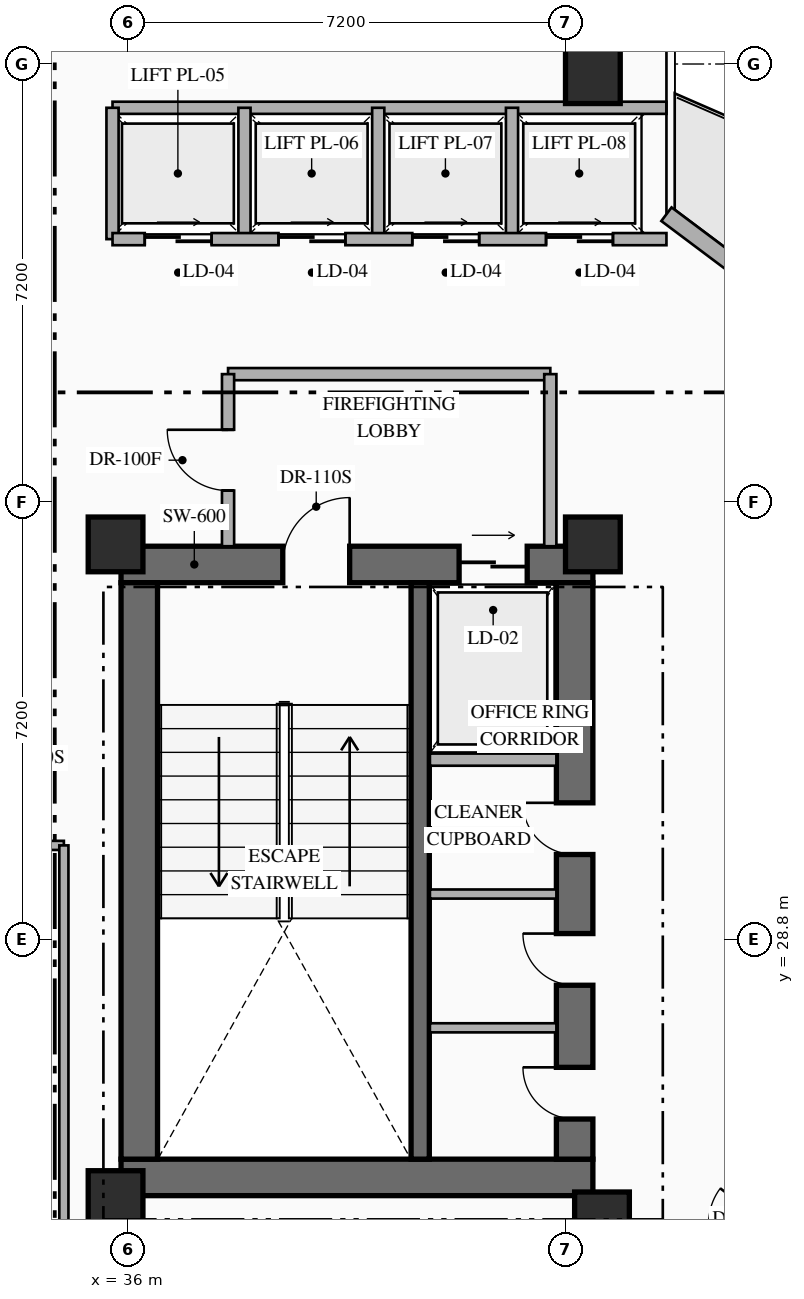
"""IFC4 building model, lengths in metres.
Left out: names, types, materials, properties, quantities, classifications, styles, units other than length and angle.
Written with IfcOpenShell. Run it as: python <this file> out.ifc"""

import sys

from ifc_helpers import new_model, si_unit, direction, frame, frame_2d, origin, origin_2d, place, context, subcontext, project, spatial, rectangle, extrude, element, fill, save


model = new_model("IFC4")
c1 = context("Model", 3, precision=1e-05, world=origin(), true_north=direction((0.0, 1.0)))
c2 = subcontext(c1, "Body", "Model", "MODEL_VIEW")
j1 = project(units=[si_unit("LENGTHUNIT", "METRE"), si_unit("PLANEANGLEUNIT", "RADIAN")], contexts=[c1])
p1 = place(None, origin())
s1 = spatial("IfcSite", under=j1, at=p1, CompositionType="ELEMENT")
p2 = place(p1, origin())
s2 = spatial("IfcBuilding", under=s1, at=p2, CompositionType="ELEMENT")
p3 = place(p2, frame((0.0, 0.0, 126.45)))
s3 = spatial("IfcBuildingStorey", under=s2, at=p3, CompositionType="ELEMENT", Elevation=126.45)
p4 = place(p3, frame((35.89, 24.89, 0.0), z_axis=(0.0, 0.0, 1.0), x_axis=(1.0, 0.0, 0.0)))
e1 = element("IfcWall", 1, at=p4, inside=s3, PredefinedType="SHEAR", context=c2, shape_type="SweptSolid", body=[
    extrude(rectangle(XDim=7.76, YDim=0.6, at=frame_2d((3.88, 0.0))), origin(), (0.0, 0.0, 1.0), 3.6),
])
p5 = place(p3, frame((35.89, 34.97, 0.0), z_axis=(0.0, 0.0, 1.0), x_axis=(1.0, 0.0, 0.0)))
e2 = element("IfcWall", 2, at=p5, inside=s3, PredefinedType="SHEAR", context=c2, shape_type="SweptSolid", body=[
    extrude(rectangle(XDim=7.76, YDim=0.6, at=frame_2d((3.88, 0.0))), origin(), (0.0, 0.0, 1.0), 3.6),
])
p6 = place(p5, frame((2.66, 0.0, 0.0)))
e3 = element("IfcOpeningElement", 3, at=p6, cuts=e2, PredefinedType="OPENING", context=c2, shape_type="SweptSolid", body=[
    extrude(rectangle(XDim=1.1, YDim=2.2, at=frame_2d((0.55, 1.1))), frame((0.0, 0.31, 0.0), z_axis=(0.0, -1.0, 0.0), x_axis=(1.0, 0.0, 0.0)), (0.0, 0.0, 1.0), 0.62),
])
p7 = place(p5, frame((5.56, 0.0, 0.0)))
e4 = element("IfcOpeningElement", 4, at=p7, cuts=e2, PredefinedType="OPENING", context=c2, shape_type="SweptSolid", body=[
    extrude(rectangle(XDim=1.12, YDim=2.15, at=frame_2d((0.56, 1.075))), frame((0.0, 0.31, 0.0), z_axis=(0.0, -1.0, 0.0), x_axis=(1.0, 0.0, 0.0)), (0.0, 0.0, 1.0), 0.62),
])
p8 = place(p3, frame((36.19, 25.19, 0.0), z_axis=(0.0, 0.0, 1.0), x_axis=(0.0, 1.0, 0.0)))
e5 = element("IfcWall", 5, at=p8, inside=s3, PredefinedType="SHEAR", context=c2, shape_type="SweptSolid", body=[
    extrude(rectangle(XDim=9.48, YDim=0.6, at=frame_2d((4.74, 0.0))), origin(), (0.0, 0.0, 1.0), 3.6),
])
p9 = place(p3, frame((43.35, 25.19, 0.0), z_axis=(0.0, 0.0, 1.0), x_axis=(0.0, 1.0, 0.0)))
e6 = element("IfcWall", 6, at=p9, inside=s3, PredefinedType="SHEAR", context=c2, shape_type="SweptSolid", body=[
    extrude(rectangle(XDim=9.48, YDim=0.6, at=frame_2d((4.74, 0.0))), origin(), (0.0, 0.0, 1.0), 3.6),
])
p10 = place(p9, frame((0.66, 0.0, 0.0)))
e7 = element("IfcOpeningElement", 7, at=p10, cuts=e6, PredefinedType="OPENING", context=c2, shape_type="SweptSolid", body=[
    extrude(rectangle(XDim=0.85, YDim=2.08, at=frame_2d((0.425, 1.04))), frame((0.0, 0.31, 0.0), z_axis=(0.0, -1.0, 0.0), x_axis=(1.0, 0.0, 0.0)), (0.0, 0.0, 1.0), 0.62),
])
p11 = place(p9, frame((2.86, 0.0, 0.0)))
e8 = element("IfcOpeningElement", 8, at=p11, cuts=e6, PredefinedType="OPENING", context=c2, shape_type="SweptSolid", body=[
    extrude(rectangle(XDim=0.85, YDim=2.08, at=frame_2d((0.425, 1.04))), frame((0.0, 0.31, 0.0), z_axis=(0.0, -1.0, 0.0), x_axis=(1.0, 0.0, 0.0)), (0.0, 0.0, 1.0), 0.62),
])
p12 = place(p9, frame((5.01, 0.0, 0.0)))
e9 = element("IfcOpeningElement", 9, at=p12, cuts=e6, PredefinedType="OPENING", context=c2, shape_type="SweptSolid", body=[
    extrude(rectangle(XDim=0.85, YDim=2.08, at=frame_2d((0.425, 1.04))), frame((0.0, 0.31, 0.0), z_axis=(0.0, -1.0, 0.0), x_axis=(1.0, 0.0, 0.0)), (0.0, 0.0, 1.0), 0.62),
])
p13 = place(p3, frame((40.81, 25.19, 0.0), z_axis=(0.0, 0.0, 1.0), x_axis=(0.0, 1.0, 0.0)))
e10 = element("IfcWall", 10, at=p13, inside=s3, PredefinedType="SHEAR", context=c2, shape_type="SweptSolid", body=[
    extrude(rectangle(XDim=9.48, YDim=0.3, at=frame_2d((4.74, 0.0))), origin(), (0.0, 0.0, 1.0), 3.6),
])
for number, where, z_axis, x_axis in (
    (11, (35.8, 24.55, 0.0), (0.0, 0.0, 1.0), (1.0, 0.0, 0.0)),
    (12, (43.8, 24.2, 0.0), (0.0, 0.0, 1.0), (1.0, 0.0, 0.0)),
    (13, (35.8, 35.3, 0.0), (0.0, 0.0, 1.0), (1.0, 0.0, 0.0)),
    (14, (43.65, 35.3, 0.0), (0.0, 0.0, 1.0), (1.0, 0.0, 0.0)),
    (15, (43.65, 43.0, 0.0), (0.0, 0.0, 1.0), (1.0, 0.0, 0.0)),
):
    element("IfcColumn", number, at=place(p3, frame(where, z_axis=z_axis, x_axis=x_axis)), inside=s3, PredefinedType="COLUMN", context=c2, shape_type="SweptSolid", body=[
        extrude(rectangle(XDim=0.9, YDim=0.9, at=origin_2d()), origin(), (0.0, 0.0, 1.0), 3.6),
    ])
p14 = place(p3, frame((44.86, 40.73, 0.0), z_axis=(0.0, 0.0, 1.0), x_axis=(0.800006902154, -0.599990797017, 0.0)))
e16 = element("IfcWall", 16, at=p14, inside=s3, PredefinedType="STANDARD", context=c2, shape_type="SweptSolid", body=[
    extrude(rectangle(XDim=29.712, YDim=0.28, at=frame_2d((14.856, 0.0))), origin(), (0.0, 0.0, 1.0), 3.34),
])
p15 = place(p14, frame((14.249, 0.0, 0.0)))
e17 = element("IfcOpeningElement", 17, at=p15, cuts=e16, PredefinedType="OPENING", context=c2, shape_type="SweptSolid", body=[
    extrude(rectangle(XDim=1.1, YDim=2.2, at=frame_2d((0.55, 1.1))), frame((0.0, 0.15, 0.0), z_axis=(0.0, -1.0, 0.0), x_axis=(1.0, 0.0, 0.0)), (0.0, 0.0, 1.0), 0.3),
])
p16 = place(p14, frame((6.528, 0.0, 0.85)))
e18 = element("IfcOpeningElement", 18, at=p16, cuts=e16, PredefinedType="OPENING", context=c2, shape_type="SweptSolid", body=[
    extrude(rectangle(XDim=1.8, YDim=2.1, at=frame_2d((0.9, 1.05))), frame((0.0, 0.15, 0.0), z_axis=(0.0, -1.0, 0.0), x_axis=(1.0, 0.0, 0.0)), (0.0, 0.0, 1.0), 0.3),
])
p17 = place(p14, frame((21.384, 0.0, 0.85)))
e19 = element("IfcOpeningElement", 19, at=p17, cuts=e16, PredefinedType="OPENING", context=c2, shape_type="SweptSolid", body=[
    extrude(rectangle(XDim=1.8, YDim=2.1, at=frame_2d((0.9, 1.05))), frame((0.0, 0.15, 0.0), z_axis=(0.0, -1.0, 0.0), x_axis=(1.0, 0.0, 0.0)), (0.0, 0.0, 1.0), 0.3),
])
p18 = place(p3, frame((40.97, 31.76, 0.0), z_axis=(0.0, 0.0, 1.0), x_axis=(1.0, 0.0, 0.0)))
e20 = element("IfcWall", 20, at=p18, inside=s3, PredefinedType="STANDARD", context=c2, shape_type="SweptSolid", body=[
    extrude(rectangle(XDim=2.08, YDim=0.2, at=frame_2d((1.04, 0.0))), origin(), (0.0, 0.0, 1.0), 3.34),
])
for number, where, z_axis, x_axis in (
    (21, (40.97, 27.35, 0.0), (0.0, 0.0, 1.0), (1.0, 0.0, 0.0)),
    (22, (40.97, 29.55, 0.0), (0.0, 0.0, 1.0), (1.0, 0.0, 0.0)),
):
    element("IfcWall", number, at=place(p3, frame(where, z_axis=z_axis, x_axis=x_axis)), inside=s3, PredefinedType="PARTITIONING", context=c2, shape_type="SweptSolid", body=[
        extrude(rectangle(XDim=2.08, YDim=0.15, at=frame_2d((1.04, 0.0))), origin(), (0.0, 0.0, 1.0), 3.34),
    ])
p19 = place(p3, frame((37.65, 38.1, 0.0), z_axis=(0.0, 0.0, 1.0), x_axis=(1.0, 0.0, 0.0)))
e23 = element("IfcWall", 23, at=p19, inside=s3, PredefinedType="STANDARD", context=c2, shape_type="SweptSolid", body=[
    extrude(rectangle(XDim=5.3, YDim=0.2, at=frame_2d((2.65, 0.0))), origin(), (0.0, 0.0, 1.0), 3.34),
])
p20 = place(p3, frame((42.95, 35.27, 0.0), z_axis=(0.0, 0.0, 1.0), x_axis=(0.0, 1.0, 0.0)))
e24 = element("IfcWall", 24, at=p20, inside=s3, PredefinedType="STANDARD", context=c2, shape_type="SweptSolid", body=[
    extrude(rectangle(XDim=2.83, YDim=0.2, at=frame_2d((1.415, 0.0))), origin(), (0.0, 0.0, 1.0), 3.34),
])
p21 = place(p3, frame((37.65, 35.27, 0.0), z_axis=(0.0, 0.0, 1.0), x_axis=(0.0, 1.0, 0.0)))
e25 = element("IfcWall", 25, at=p21, inside=s3, PredefinedType="STANDARD", context=c2, shape_type="SweptSolid", body=[
    extrude(rectangle(XDim=2.83, YDim=0.2, at=frame_2d((1.415, 0.0))), origin(), (0.0, 0.0, 1.0), 3.34),
])
p22 = place(p21, frame((0.915, 0.0, 0.0)))
e26 = element("IfcOpeningElement", 26, at=p22, cuts=e25, PredefinedType="OPENING", context=c2, shape_type="SweptSolid", body=[
    extrude(rectangle(XDim=1.0, YDim=2.2, at=frame_2d((0.5, 1.1))), frame((0.0, 0.11, 0.0), z_axis=(0.0, -1.0, 0.0), x_axis=(1.0, 0.0, 0.0)), (0.0, 0.0, 1.0), 0.22),
])
p23 = place(p3, frame((35.75, 42.48, 0.0), z_axis=(0.0, 0.0, 1.0), x_axis=(1.0, 0.0, 0.0)))
e27 = element("IfcWall", 27, at=p23, inside=s3, PredefinedType="STANDARD", context=c2, shape_type="SweptSolid", body=[
    extrude(rectangle(XDim=9.11, YDim=0.2, at=frame_2d((4.555, 0.0))), origin(), (0.0, 0.0, 1.0), 3.34),
])
for number, where, z_axis, x_axis in (
    (28, (35.75, 40.32, 0.0), (0.0, 0.0, 1.0), (0.0, 1.0, 0.0)),
    (29, (37.92, 40.32, 0.0), (0.0, 0.0, 1.0), (0.0, 1.0, 0.0)),
    (30, (40.12, 40.32, 0.0), (0.0, 0.0, 1.0), (0.0, 1.0, 0.0)),
    (31, (42.32, 40.32, 0.0), (0.0, 0.0, 1.0), (0.0, 1.0, 0.0)),
):
    element("IfcWall", number, at=place(p3, frame(where, z_axis=z_axis, x_axis=x_axis)), inside=s3, PredefinedType="STANDARD", context=c2, shape_type="SweptSolid", body=[
        extrude(rectangle(XDim=2.16, YDim=0.2, at=frame_2d((1.08, 0.0))), origin(), (0.0, 0.0, 1.0), 3.34),
    ])
p24 = place(p3, frame((35.75, 40.32, 0.0), z_axis=(0.0, 0.0, 1.0), x_axis=(1.0, 0.0, 0.0)))
e32 = element("IfcWall", 32, at=p24, inside=s3, PredefinedType="STANDARD", context=c2, shape_type="SweptSolid", body=[
    extrude(rectangle(XDim=9.11, YDim=0.2, at=frame_2d((4.555, 0.0))), origin(), (0.0, 0.0, 1.0), 3.34),
])
p25 = place(p24, frame((0.53, 0.0, 0.0)))
e33 = element("IfcOpeningElement", 33, at=p25, cuts=e32, PredefinedType="OPENING", context=c2, shape_type="SweptSolid", body=[
    extrude(rectangle(XDim=1.1, YDim=2.18, at=frame_2d((0.55, 1.09))), frame((0.0, 0.11, 0.0), z_axis=(0.0, -1.0, 0.0), x_axis=(1.0, 0.0, 0.0)), (0.0, 0.0, 1.0), 0.22),
])
p26 = place(p24, frame((2.73, 0.0, 0.0)))
e34 = element("IfcOpeningElement", 34, at=p26, cuts=e32, PredefinedType="OPENING", context=c2, shape_type="SweptSolid", body=[
    extrude(rectangle(XDim=1.1, YDim=2.18, at=frame_2d((0.55, 1.09))), frame((0.0, 0.11, 0.0), z_axis=(0.0, -1.0, 0.0), x_axis=(1.0, 0.0, 0.0)), (0.0, 0.0, 1.0), 0.22),
])
p27 = place(p24, frame((4.93, 0.0, 0.0)))
e35 = element("IfcOpeningElement", 35, at=p27, cuts=e32, PredefinedType="OPENING", context=c2, shape_type="SweptSolid", body=[
    extrude(rectangle(XDim=1.1, YDim=2.18, at=frame_2d((0.55, 1.09))), frame((0.0, 0.11, 0.0), z_axis=(0.0, -1.0, 0.0), x_axis=(1.0, 0.0, 0.0)), (0.0, 0.0, 1.0), 0.22),
])
p28 = place(p24, frame((7.13, 0.0, 0.0)))
e36 = element("IfcOpeningElement", 36, at=p28, cuts=e32, PredefinedType="OPENING", context=c2, shape_type="SweptSolid", body=[
    extrude(rectangle(XDim=1.1, YDim=2.18, at=frame_2d((0.55, 1.09))), frame((0.0, 0.11, 0.0), z_axis=(0.0, -1.0, 0.0), x_axis=(1.0, 0.0, 0.0)), (0.0, 0.0, 1.0), 0.22),
])
p29 = place(p3, frame((25.55, 30.35, 0.0), z_axis=(0.0, 0.0, 1.0), x_axis=(1.0, 0.0, 0.0)))
e37 = element("IfcWall", 37, at=p29, inside=s3, PredefinedType="PARTITIONING", context=c2, shape_type="SweptSolid", body=[
    extrude(rectangle(XDim=9.4, YDim=0.15, at=frame_2d((4.7, 0.0))), origin(), (0.0, 0.0, 1.0), 3.34),
])
p30 = place(p29, frame((7.638, 0.0, 0.0)))
e38 = element("IfcOpeningElement", 38, at=p30, cuts=e37, PredefinedType="OPENING", context=c2, shape_type="SweptSolid", body=[
    extrude(rectangle(XDim=1.0, YDim=2.15, at=frame_2d((0.5, 1.075))), frame((0.0, 0.085, 0.0), z_axis=(0.0, -1.0, 0.0), x_axis=(1.0, 0.0, 0.0)), (0.0, 0.0, 1.0), 0.17),
])
p31 = place(p3, frame((34.95, 23.2, 0.0), z_axis=(0.0, 0.0, 1.0), x_axis=(0.0, 1.0, 0.0)))
e39 = element("IfcWall", 39, at=p31, inside=s3, PredefinedType="PARTITIONING", context=c2, shape_type="SweptSolid", body=[
    extrude(rectangle(XDim=7.15, YDim=0.15, at=frame_2d((3.575, 0.0))), origin(), (0.0, 0.0, 1.0), 3.34),
])
p32 = place(p3, frame((38.504, 13.472, 0.0), z_axis=(0.0, 0.0, 1.0), x_axis=(0.6, 0.8, 0.0)))
e40 = element("IfcWall", 40, at=p32, inside=s3, PredefinedType="PARTITIONING", context=c2, shape_type="SweptSolid", body=[
    extrude(rectangle(XDim=25.72, YDim=0.15, at=frame_2d((12.86, 0.0))), origin(), (0.0, 0.0, 1.0), 3.34),
])
p33 = place(p32, frame((12.385, 0.0, 0.0)))
e41 = element("IfcOpeningElement", 41, at=p33, cuts=e40, PredefinedType="OPENING", context=c2, shape_type="SweptSolid", body=[
    extrude(rectangle(XDim=0.95, YDim=2.15, at=frame_2d((0.475, 1.075))), frame((0.0, 0.085, 0.0), z_axis=(0.0, -1.0, 0.0), x_axis=(1.0, 0.0, 0.0)), (0.0, 0.0, 1.0), 0.17),
])
p34 = place(p6, origin())
e42 = element("IfcDoor", 42, at=p34, inside=s3, OperationType="SINGLE_SWING_RIGHT", PredefinedType="DOOR", context=c2, shape_type="SweptSolid", body=[
    extrude(rectangle(XDim=1.1, YDim=2.2, at=frame_2d((0.55, 1.1))), frame((0.0, 0.025, 0.0), z_axis=(0.0, -1.0, 0.0), x_axis=(1.0, 0.0, 0.0)), (0.0, 0.0, 1.0), 0.05),
])
fill(e3, e42)
p35 = place(p7, origin())
e43 = element("IfcDoor", 43, at=p35, inside=s3, OperationType="SLIDING_TO_RIGHT", PredefinedType="USERDEFINED", context=c2, shape_type="SweptSolid", body=[
    extrude(rectangle(XDim=1.12, YDim=2.15, at=frame_2d((0.56, 1.075))), frame((0.0, 0.025, 0.0), z_axis=(0.0, -1.0, 0.0), x_axis=(1.0, 0.0, 0.0)), (0.0, 0.0, 1.0), 0.05),
])
fill(e4, e43)
p36 = place(p10, origin())
e44 = element("IfcDoor", 44, at=p36, inside=s3, OperationType="SINGLE_SWING_RIGHT", PredefinedType="DOOR", context=c2, shape_type="SweptSolid", body=[
    extrude(rectangle(XDim=0.85, YDim=2.08, at=frame_2d((0.425, 1.04))), frame((0.0, 0.025, 0.0), z_axis=(0.0, -1.0, 0.0), x_axis=(1.0, 0.0, 0.0)), (0.0, 0.0, 1.0), 0.05),
])
fill(e7, e44)
p37 = place(p11, origin())
e45 = element("IfcDoor", 45, at=p37, inside=s3, OperationType="SINGLE_SWING_RIGHT", PredefinedType="DOOR", context=c2, shape_type="SweptSolid", body=[
    extrude(rectangle(XDim=0.85, YDim=2.08, at=frame_2d((0.425, 1.04))), frame((0.0, 0.025, 0.0), z_axis=(0.0, -1.0, 0.0), x_axis=(1.0, 0.0, 0.0)), (0.0, 0.0, 1.0), 0.05),
])
fill(e8, e45)
p38 = place(p12, origin())
e46 = element("IfcDoor", 46, at=p38, inside=s3, OperationType="SINGLE_SWING_RIGHT", PredefinedType="DOOR", context=c2, shape_type="SweptSolid", body=[
    extrude(rectangle(XDim=0.85, YDim=2.08, at=frame_2d((0.425, 1.04))), frame((0.0, 0.025, 0.0), z_axis=(0.0, -1.0, 0.0), x_axis=(1.0, 0.0, 0.0)), (0.0, 0.0, 1.0), 0.05),
])
fill(e9, e46)
p39 = place(p22, origin())
e47 = element("IfcDoor", 47, at=p39, inside=s3, OperationType="SINGLE_SWING_RIGHT", PredefinedType="DOOR", context=c2, shape_type="SweptSolid", body=[
    extrude(rectangle(XDim=1.0, YDim=2.2, at=frame_2d((0.5, 1.1))), frame((0.0, 0.025, 0.0), z_axis=(0.0, -1.0, 0.0), x_axis=(1.0, 0.0, 0.0)), (0.0, 0.0, 1.0), 0.05),
])
fill(e26, e47)
p40 = place(p25, origin())
e48 = element("IfcDoor", 48, at=p40, inside=s3, OperationType="SLIDING_TO_RIGHT", PredefinedType="USERDEFINED", context=c2, shape_type="SweptSolid", body=[
    extrude(rectangle(XDim=1.1, YDim=2.18, at=frame_2d((0.55, 1.09))), frame((0.0, 0.025, 0.0), z_axis=(0.0, -1.0, 0.0), x_axis=(1.0, 0.0, 0.0)), (0.0, 0.0, 1.0), 0.05),
])
fill(e33, e48)
p41 = place(p26, origin())
e49 = element("IfcDoor", 49, at=p41, inside=s3, OperationType="SLIDING_TO_RIGHT", PredefinedType="USERDEFINED", context=c2, shape_type="SweptSolid", body=[
    extrude(rectangle(XDim=1.1, YDim=2.18, at=frame_2d((0.55, 1.09))), frame((0.0, 0.025, 0.0), z_axis=(0.0, -1.0, 0.0), x_axis=(1.0, 0.0, 0.0)), (0.0, 0.0, 1.0), 0.05),
])
fill(e34, e49)
p42 = place(p27, origin())
e50 = element("IfcDoor", 50, at=p42, inside=s3, OperationType="SLIDING_TO_RIGHT", PredefinedType="USERDEFINED", context=c2, shape_type="SweptSolid", body=[
    extrude(rectangle(XDim=1.1, YDim=2.18, at=frame_2d((0.55, 1.09))), frame((0.0, 0.025, 0.0), z_axis=(0.0, -1.0, 0.0), x_axis=(1.0, 0.0, 0.0)), (0.0, 0.0, 1.0), 0.05),
])
fill(e35, e50)
p43 = place(p28, origin())
e51 = element("IfcDoor", 51, at=p43, inside=s3, OperationType="SLIDING_TO_RIGHT", PredefinedType="USERDEFINED", context=c2, shape_type="SweptSolid", body=[
    extrude(rectangle(XDim=1.1, YDim=2.18, at=frame_2d((0.55, 1.09))), frame((0.0, 0.025, 0.0), z_axis=(0.0, -1.0, 0.0), x_axis=(1.0, 0.0, 0.0)), (0.0, 0.0, 1.0), 0.05),
])
fill(e36, e51)
save(model, sys.argv[1])
